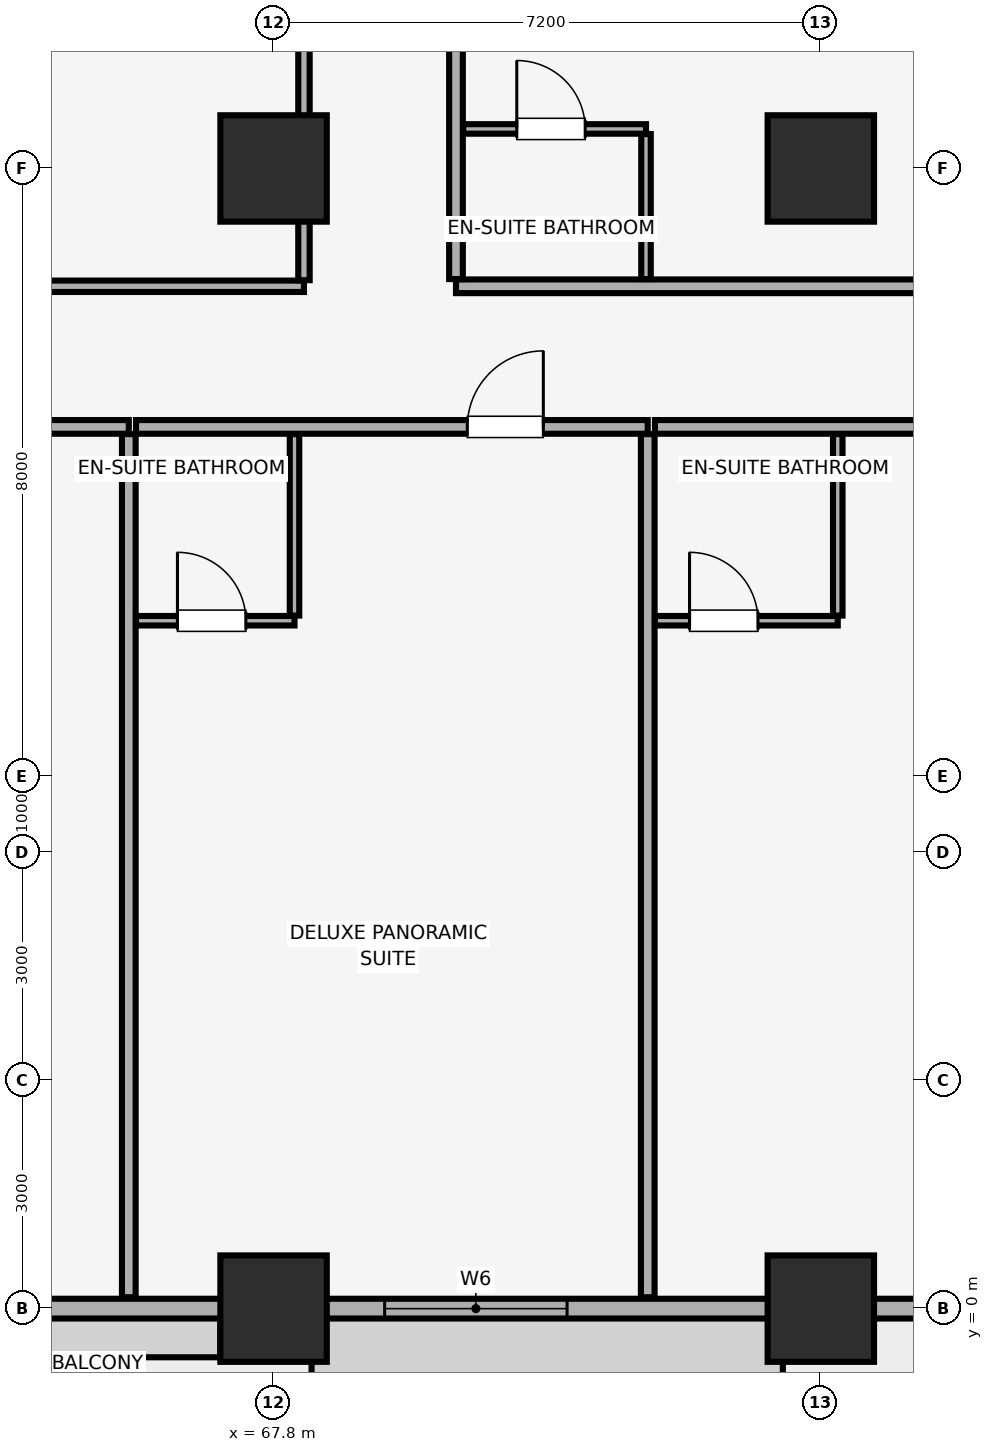
"""IFC4 building model, lengths in metres.
Left out: names, types, materials, properties, quantities, classifications, styles, units other than length and angle.
Written with IfcOpenShell. Run it as: python <this file> out.ifc"""

import sys

from ifc_helpers import new_model, si_unit, direction, frame, frame_2d, origin, origin_2d, place, context, subcontext, project, spatial, rectangle, extrude, element, fill, save


model = new_model("IFC4")
c1 = context("Model", 3, precision=1e-05, world=origin(), true_north=direction((0.0, 1.0)))
c2 = subcontext(c1, "Body", "Model", "MODEL_VIEW")
j1 = project(units=[si_unit("LENGTHUNIT", "METRE"), si_unit("PLANEANGLEUNIT", "RADIAN")], contexts=[c1])
p1 = place(None, origin())
s1 = spatial("IfcSite", under=j1, at=p1, CompositionType="ELEMENT")
p2 = place(p1, origin())
s2 = spatial("IfcBuilding", under=s1, at=p2, CompositionType="ELEMENT")
p3 = place(p2, frame((0.0, 0.0, 57.65)))
s3 = spatial("IfcBuildingStorey", under=s2, at=p3, CompositionType="ELEMENT", Elevation=57.65)
for number, where, z_axis, x_axis in (
    (1, (67.8, 0.0, 0.0), (0.0, 0.0, 1.0), (1.0, 0.0, 0.0)),
    (2, (75.0, 0.0, 0.0), (0.0, 0.0, 1.0), (1.0, 0.0, 0.0)),
    (3, (67.8, 15.0, 0.0), (0.0, 0.0, 1.0), (1.0, 0.0, 0.0)),
    (4, (75.0, 15.0, 0.0), (0.0, 0.0, 1.0), (1.0, 0.0, 0.0)),
):
    element("IfcColumn", number, at=place(p3, frame(where, z_axis=z_axis, x_axis=x_axis)), inside=s3, PredefinedType="COLUMN", context=c2, shape_type="SweptSolid", body=[
        extrude(rectangle(XDim=1.4, YDim=1.4, at=origin_2d()), origin(), (0.0, 0.0, 1.0), 3.51),
    ])
p4 = place(p3, frame((4.2, 0.0, 0.0), z_axis=(0.0, 0.0, 1.0), x_axis=(1.0, 0.0, 0.0)))
e5 = element("IfcWall", 5, at=p4, inside=s3, PredefinedType="SOLIDWALL", context=c2, shape_type="SweptSolid", body=[
    extrude(rectangle(XDim=75.6, YDim=0.26, at=frame_2d((37.8, 0.0))), origin(), (0.0, 0.0, 1.0), 2.56),
])
p5 = place(p4, frame((21.383, 0.0, 0.0)))
e6 = element("IfcOpeningElement", 6, at=p5, cuts=e5, PredefinedType="OPENING", context=c2, shape_type="SweptSolid", body=[
    extrude(rectangle(XDim=1.1, YDim=2.15, at=frame_2d((0.55, 1.075))), frame((0.0, 0.14, 0.0), z_axis=(0.0, -1.0, 0.0), x_axis=(1.0, 0.0, 0.0)), (0.0, 0.0, 1.0), 0.28),
])
p6 = place(p4, frame((37.25, 0.0, 0.0)))
e7 = element("IfcOpeningElement", 7, at=p6, cuts=e5, PredefinedType="OPENING", context=c2, shape_type="SweptSolid", body=[
    extrude(rectangle(XDim=1.1, YDim=2.15, at=frame_2d((0.55, 1.075))), frame((0.0, 0.14, 0.0), z_axis=(0.0, -1.0, 0.0), x_axis=(1.0, 0.0, 0.0)), (0.0, 0.0, 1.0), 0.28),
])
p7 = place(p4, frame((53.117, 0.0, 0.0)))
e8 = element("IfcOpeningElement", 8, at=p7, cuts=e5, PredefinedType="OPENING", context=c2, shape_type="SweptSolid", body=[
    extrude(rectangle(XDim=1.1, YDim=2.15, at=frame_2d((0.55, 1.075))), frame((0.0, 0.14, 0.0), z_axis=(0.0, -1.0, 0.0), x_axis=(1.0, 0.0, 0.0)), (0.0, 0.0, 1.0), 0.28),
])
p8 = place(p4, frame((1.035, 0.0, 0.85)))
e9 = element("IfcOpeningElement", 9, at=p8, cuts=e5, PredefinedType="OPENING", context=c2, shape_type="SweptSolid", body=[
    extrude(rectangle(XDim=2.4, YDim=1.5, at=frame_2d((1.2, 0.75))), frame((0.0, 0.14, 0.0), z_axis=(0.0, -1.0, 0.0), x_axis=(1.0, 0.0, 0.0)), (0.0, 0.0, 1.0), 0.28),
])
p9 = place(p4, frame((8.138, 0.0, 0.85)))
e10 = element("IfcOpeningElement", 10, at=p9, cuts=e5, PredefinedType="OPENING", context=c2, shape_type="SweptSolid", body=[
    extrude(rectangle(XDim=2.4, YDim=1.5, at=frame_2d((1.2, 0.75))), frame((0.0, 0.14, 0.0), z_axis=(0.0, -1.0, 0.0), x_axis=(1.0, 0.0, 0.0)), (0.0, 0.0, 1.0), 0.28),
])
p10 = place(p4, frame((15.153, 0.0, 0.85)))
e11 = element("IfcOpeningElement", 11, at=p10, cuts=e5, PredefinedType="OPENING", context=c2, shape_type="SweptSolid", body=[
    extrude(rectangle(XDim=2.4, YDim=1.5, at=frame_2d((1.2, 0.75))), frame((0.0, 0.14, 0.0), z_axis=(0.0, -1.0, 0.0), x_axis=(1.0, 0.0, 0.0)), (0.0, 0.0, 1.0), 0.28),
])
p11 = place(p4, frame((23.127, 0.0, 0.85)))
e12 = element("IfcOpeningElement", 12, at=p11, cuts=e5, PredefinedType="OPENING", context=c2, shape_type="SweptSolid", body=[
    extrude(rectangle(XDim=2.4, YDim=1.5, at=frame_2d((1.2, 0.75))), frame((0.0, 0.14, 0.0), z_axis=(0.0, -1.0, 0.0), x_axis=(1.0, 0.0, 0.0)), (0.0, 0.0, 1.0), 0.28),
])
p12 = place(p4, frame((29.179, 0.0, 0.85)))
e13 = element("IfcOpeningElement", 13, at=p12, cuts=e5, PredefinedType="OPENING", context=c2, shape_type="SweptSolid", body=[
    extrude(rectangle(XDim=2.4, YDim=1.5, at=frame_2d((1.2, 0.75))), frame((0.0, 0.14, 0.0), z_axis=(0.0, -1.0, 0.0), x_axis=(1.0, 0.0, 0.0)), (0.0, 0.0, 1.0), 0.28),
])
p13 = place(p4, frame((34.983, 0.0, 0.85)))
e14 = element("IfcOpeningElement", 14, at=p13, cuts=e5, PredefinedType="OPENING", context=c2, shape_type="SweptSolid", body=[
    extrude(rectangle(XDim=1.5, YDim=1.4, at=frame_2d((0.75, 0.7))), frame((0.0, 0.14, 0.0), z_axis=(0.0, -1.0, 0.0), x_axis=(1.0, 0.0, 0.0)), (0.0, 0.0, 1.0), 0.28),
])
p14 = place(p4, frame((39.117, 0.0, 0.85)))
e15 = element("IfcOpeningElement", 15, at=p14, cuts=e5, PredefinedType="OPENING", context=c2, shape_type="SweptSolid", body=[
    extrude(rectangle(XDim=1.5, YDim=1.4, at=frame_2d((0.75, 0.7))), frame((0.0, 0.14, 0.0), z_axis=(0.0, -1.0, 0.0), x_axis=(1.0, 0.0, 0.0)), (0.0, 0.0, 1.0), 0.28),
])
p15 = place(p4, frame((44.021, 0.0, 0.85)))
e16 = element("IfcOpeningElement", 16, at=p15, cuts=e5, PredefinedType="OPENING", context=c2, shape_type="SweptSolid", body=[
    extrude(rectangle(XDim=2.4, YDim=1.5, at=frame_2d((1.2, 0.75))), frame((0.0, 0.14, 0.0), z_axis=(0.0, -1.0, 0.0), x_axis=(1.0, 0.0, 0.0)), (0.0, 0.0, 1.0), 0.28),
])
p16 = place(p4, frame((50.073, 0.0, 0.85)))
e17 = element("IfcOpeningElement", 17, at=p16, cuts=e5, PredefinedType="OPENING", context=c2, shape_type="SweptSolid", body=[
    extrude(rectangle(XDim=2.4, YDim=1.5, at=frame_2d((1.2, 0.75))), frame((0.0, 0.14, 0.0), z_axis=(0.0, -1.0, 0.0), x_axis=(1.0, 0.0, 0.0)), (0.0, 0.0, 1.0), 0.28),
])
p17 = place(p4, frame((58.048, 0.0, 0.85)))
e18 = element("IfcOpeningElement", 18, at=p17, cuts=e5, PredefinedType="OPENING", context=c2, shape_type="SweptSolid", body=[
    extrude(rectangle(XDim=2.4, YDim=1.5, at=frame_2d((1.2, 0.75))), frame((0.0, 0.14, 0.0), z_axis=(0.0, -1.0, 0.0), x_axis=(1.0, 0.0, 0.0)), (0.0, 0.0, 1.0), 0.28),
])
p18 = place(p4, frame((65.062, 0.0, 0.85)))
e19 = element("IfcOpeningElement", 19, at=p18, cuts=e5, PredefinedType="OPENING", context=c2, shape_type="SweptSolid", body=[
    extrude(rectangle(XDim=2.4, YDim=1.5, at=frame_2d((1.2, 0.75))), frame((0.0, 0.14, 0.0), z_axis=(0.0, -1.0, 0.0), x_axis=(1.0, 0.0, 0.0)), (0.0, 0.0, 1.0), 0.28),
])
p19 = place(p4, frame((72.165, 0.0, 0.85)))
e20 = element("IfcOpeningElement", 20, at=p19, cuts=e5, PredefinedType="OPENING", context=c2, shape_type="SweptSolid", body=[
    extrude(rectangle(XDim=2.4, YDim=1.5, at=frame_2d((1.2, 0.75))), frame((0.0, 0.14, 0.0), z_axis=(0.0, -1.0, 0.0), x_axis=(1.0, 0.0, 0.0)), (0.0, 0.0, 1.0), 0.28),
])
p20 = place(p3, frame((59.163, 11.6, 0.0), z_axis=(0.0, 0.0, 1.0), x_axis=(1.0, 0.0, 0.0)))
e21 = element("IfcWall", 21, at=p20, inside=s3, PredefinedType="PARTITIONING", context=c2, shape_type="SweptSolid", body=[
    extrude(rectangle(XDim=6.732, YDim=0.18, at=frame_2d((3.366, 0.0))), origin(), (0.0, 0.0, 1.0), 3.51),
])
p21 = place(p20, frame((4.359, 0.0, 0.0)))
e22 = element("IfcOpeningElement", 22, at=p21, cuts=e21, PredefinedType="OPENING", context=c2, shape_type="SweptSolid", body=[
    extrude(rectangle(XDim=1.0, YDim=2.15, at=frame_2d((0.5, 1.075))), frame((0.0, 0.1, 0.0), z_axis=(0.0, -1.0, 0.0), x_axis=(1.0, 0.0, 0.0)), (0.0, 0.0, 1.0), 0.2),
])
p22 = place(p3, frame((65.896, 0.15, 0.0), z_axis=(0.0, 0.0, 1.0), x_axis=(0.0, 1.0, 0.0)))
e23 = element("IfcWall", 23, at=p22, inside=s3, PredefinedType="PARTITIONING", context=c2, shape_type="SweptSolid", body=[
    extrude(rectangle(XDim=11.355, YDim=0.18, at=frame_2d((5.677, 0.0))), origin(), (0.0, 0.0, 1.0), 3.51),
])
p23 = place(p3, frame((65.99, 11.6, 0.0), z_axis=(0.0, 0.0, 1.0), x_axis=(1.0, 0.0, 0.0)))
e24 = element("IfcWall", 24, at=p23, inside=s3, PredefinedType="PARTITIONING", context=c2, shape_type="SweptSolid", body=[
    extrude(rectangle(XDim=6.732, YDim=0.18, at=frame_2d((3.366, 0.0))), origin(), (0.0, 0.0, 1.0), 3.51),
])
p24 = place(p23, frame((4.359, 0.0, 0.0)))
e25 = element("IfcOpeningElement", 25, at=p24, cuts=e24, PredefinedType="OPENING", context=c2, shape_type="SweptSolid", body=[
    extrude(rectangle(XDim=1.0, YDim=2.15, at=frame_2d((0.5, 1.075))), frame((0.0, 0.1, 0.0), z_axis=(0.0, -1.0, 0.0), x_axis=(1.0, 0.0, 0.0)), (0.0, 0.0, 1.0), 0.2),
])
p25 = place(p3, frame((72.723, 0.15, 0.0), z_axis=(0.0, 0.0, 1.0), x_axis=(0.0, 1.0, 0.0)))
e26 = element("IfcWall", 26, at=p25, inside=s3, PredefinedType="PARTITIONING", context=c2, shape_type="SweptSolid", body=[
    extrude(rectangle(XDim=11.355, YDim=0.18, at=frame_2d((5.677, 0.0))), origin(), (0.0, 0.0, 1.0), 3.51),
])
p26 = place(p3, frame((65.99, 9.05, 0.0), z_axis=(0.0, 0.0, 1.0), x_axis=(1.0, 0.0, 0.0)))
e27 = element("IfcWall", 27, at=p26, inside=s3, PredefinedType="PARTITIONING", context=c2, shape_type="SweptSolid", body=[
    extrude(rectangle(XDim=2.085, YDim=0.125, at=frame_2d((1.042, 0.0))), origin(), (0.0, 0.0, 1.0), 3.51),
])
p27 = place(p26, frame((0.545, 0.0, 0.0)))
e28 = element("IfcOpeningElement", 28, at=p27, cuts=e27, PredefinedType="OPENING", context=c2, shape_type="SweptSolid", body=[
    extrude(rectangle(XDim=0.9, YDim=2.1, at=frame_2d((0.45, 1.05))), frame((0.0, 0.073, 0.0), z_axis=(0.0, -1.0, 0.0), x_axis=(1.0, 0.0, 0.0)), (0.0, 0.0, 1.0), 0.145),
])
p28 = place(p3, frame((68.075, 9.117, 0.0), z_axis=(0.0, 0.0, 1.0), x_axis=(0.0, 1.0, 0.0)))
e29 = element("IfcWall", 29, at=p28, inside=s3, PredefinedType="PARTITIONING", context=c2, shape_type="SweptSolid", body=[
    extrude(rectangle(XDim=2.387, YDim=0.125, at=frame_2d((1.194, 0.0))), origin(), (0.0, 0.0, 1.0), 3.51),
])
p29 = place(p3, frame((72.818, 11.6, 0.0), z_axis=(0.0, 0.0, 1.0), x_axis=(1.0, 0.0, 0.0)))
e30 = element("IfcWall", 30, at=p29, inside=s3, PredefinedType="PARTITIONING", context=c2, shape_type="SweptSolid", body=[
    extrude(rectangle(XDim=11.032, YDim=0.18, at=frame_2d((5.516, 0.0))), origin(), (0.0, 0.0, 1.0), 3.51),
])
p30 = place(p29, frame((4.519, 0.0, 0.0)))
e31 = element("IfcOpeningElement", 31, at=p30, cuts=e30, PredefinedType="OPENING", context=c2, shape_type="SweptSolid", body=[
    extrude(rectangle(XDim=1.0, YDim=2.15, at=frame_2d((0.5, 1.075))), frame((0.0, 0.1, 0.0), z_axis=(0.0, -1.0, 0.0), x_axis=(1.0, 0.0, 0.0)), (0.0, 0.0, 1.0), 0.2),
])
p31 = place(p3, frame((72.818, 9.05, 0.0), z_axis=(0.0, 0.0, 1.0), x_axis=(1.0, 0.0, 0.0)))
e32 = element("IfcWall", 32, at=p31, inside=s3, PredefinedType="PARTITIONING", context=c2, shape_type="SweptSolid", body=[
    extrude(rectangle(XDim=2.405, YDim=0.125, at=frame_2d((1.203, 0.0))), origin(), (0.0, 0.0, 1.0), 3.51),
])
p32 = place(p31, frame((0.455, 0.0, 0.0)))
e33 = element("IfcOpeningElement", 33, at=p32, cuts=e32, PredefinedType="OPENING", context=c2, shape_type="SweptSolid", body=[
    extrude(rectangle(XDim=0.9, YDim=2.1, at=frame_2d((0.45, 1.05))), frame((0.0, 0.073, 0.0), z_axis=(0.0, -1.0, 0.0), x_axis=(1.0, 0.0, 0.0)), (0.0, 0.0, 1.0), 0.145),
])
p33 = place(p3, frame((75.223, 9.117, 0.0), z_axis=(0.0, 0.0, 1.0), x_axis=(0.0, 1.0, 0.0)))
e34 = element("IfcWall", 34, at=p33, inside=s3, PredefinedType="PARTITIONING", context=c2, shape_type="SweptSolid", body=[
    extrude(rectangle(XDim=2.387, YDim=0.125, at=frame_2d((1.194, 0.0))), origin(), (0.0, 0.0, 1.0), 2.898),
])
p34 = place(p3, frame((57.88, 13.45, 0.0), z_axis=(0.0, 0.0, 1.0), x_axis=(1.0, 0.0, 0.0)))
e35 = element("IfcWall", 35, at=p34, inside=s3, PredefinedType="PARTITIONING", context=c2, shape_type="SweptSolid", body=[
    extrude(rectangle(XDim=10.32, YDim=0.15, at=frame_2d((5.16, 0.0))), origin(), (0.0, 0.0, 1.0), 3.51),
])
p35 = place(p34, frame((4.62, 0.0, 0.0)))
e36 = element("IfcOpeningElement", 36, at=p35, cuts=e35, PredefinedType="OPENING", context=c2, shape_type="SweptSolid", body=[
    extrude(rectangle(XDim=1.0, YDim=2.15, at=frame_2d((0.5, 1.075))), frame((0.0, 0.085, 0.0), z_axis=(0.0, -1.0, 0.0), x_axis=(1.0, 0.0, 0.0)), (0.0, 0.0, 1.0), 0.17),
])
p36 = place(p3, frame((68.2, 13.53, 0.0), z_axis=(0.0, 0.0, 1.0), x_axis=(0.0, 1.0, 0.0)))
e37 = element("IfcWall", 37, at=p36, inside=s3, PredefinedType="PARTITIONING", context=c2, shape_type="SweptSolid", body=[
    extrude(rectangle(XDim=15.86, YDim=0.15, at=frame_2d((7.93, 0.0))), origin(), (0.0, 0.0, 1.0), 3.51),
])
p37 = place(p3, frame((70.2, 13.45, 0.0), z_axis=(0.0, 0.0, 1.0), x_axis=(1.0, 0.0, 0.0)))
e38 = element("IfcWall", 38, at=p37, inside=s3, PredefinedType="PARTITIONING", context=c2, shape_type="SweptSolid", body=[
    extrude(rectangle(XDim=13.65, YDim=0.18, at=frame_2d((6.825, 0.0))), origin(), (0.0, 0.0, 1.0), 3.51),
])
p38 = place(p3, frame((70.2, 13.545, 0.0), z_axis=(0.0, 0.0, 1.0), x_axis=(0.0, 1.0, 0.0)))
e39 = element("IfcWall", 39, at=p38, inside=s3, PredefinedType="PARTITIONING", context=c2, shape_type="SweptSolid", body=[
    extrude(rectangle(XDim=7.78, YDim=0.18, at=frame_2d((3.89, 0.0))), origin(), (0.0, 0.0, 1.0), 3.51),
])
p39 = place(p38, frame((4.875, 0.0, 0.0)))
e40 = element("IfcOpeningElement", 40, at=p39, cuts=e39, PredefinedType="OPENING", context=c2, shape_type="SweptSolid", body=[
    extrude(rectangle(XDim=1.0, YDim=2.15, at=frame_2d((0.5, 1.075))), frame((0.0, 0.1, 0.0), z_axis=(0.0, -1.0, 0.0), x_axis=(1.0, 0.0, 0.0)), (0.0, 0.0, 1.0), 0.2),
])
p40 = place(p3, frame((70.295, 15.52, 0.0), z_axis=(0.0, 0.0, 1.0), x_axis=(1.0, 0.0, 0.0)))
e41 = element("IfcWall", 41, at=p40, inside=s3, PredefinedType="PARTITIONING", context=c2, shape_type="SweptSolid", body=[
    extrude(rectangle(XDim=2.405, YDim=0.125, at=frame_2d((1.203, 0.0))), origin(), (0.0, 0.0, 1.0), 3.51),
])
p41 = place(p40, frame((0.705, 0.0, 0.0)))
e42 = element("IfcOpeningElement", 42, at=p41, cuts=e41, PredefinedType="OPENING", context=c2, shape_type="SweptSolid", body=[
    extrude(rectangle(XDim=0.9, YDim=2.1, at=frame_2d((0.45, 1.05))), frame((0.0, 0.073, 0.0), z_axis=(0.0, -1.0, 0.0), x_axis=(1.0, 0.0, 0.0)), (0.0, 0.0, 1.0), 0.145),
])
p42 = place(p3, frame((72.7, 13.545, 0.0), z_axis=(0.0, 0.0, 1.0), x_axis=(0.0, 1.0, 0.0)))
e43 = element("IfcWall", 43, at=p42, inside=s3, PredefinedType="PARTITIONING", context=c2, shape_type="SweptSolid", body=[
    extrude(rectangle(XDim=1.907, YDim=0.125, at=frame_2d((0.954, 0.0))), origin(), (0.0, 0.0, 1.0), 3.51),
])
p43 = place(p18, origin())
e44 = element("IfcWindow", 44, at=p43, inside=s3, PartitioningType="SINGLE_PANEL", PredefinedType="WINDOW", context=c2, shape_type="SweptSolid", body=[
    extrude(rectangle(XDim=2.4, YDim=1.5, at=frame_2d((1.2, 0.75))), frame((0.0, 0.03, 0.0), z_axis=(0.0, -1.0, 0.0), x_axis=(1.0, 0.0, 0.0)), (0.0, 0.0, 1.0), 0.06),
])
fill(e19, e44)
p44 = place(p24, origin())
e45 = element("IfcDoor", 45, at=p44, inside=s3, OperationType="SINGLE_SWING_RIGHT", PredefinedType="DOOR", context=c2, shape_type="SweptSolid", body=[
    extrude(rectangle(XDim=1.0, YDim=2.15, at=frame_2d((0.5, 1.075))), frame((0.0, 0.025, 0.0), z_axis=(0.0, -1.0, 0.0), x_axis=(1.0, 0.0, 0.0)), (0.0, 0.0, 1.0), 0.05),
])
fill(e25, e45)
p45 = place(p27, origin())
e46 = element("IfcDoor", 46, at=p45, inside=s3, OperationType="SINGLE_SWING_LEFT", PredefinedType="DOOR", context=c2, shape_type="SweptSolid", body=[
    extrude(rectangle(XDim=0.9, YDim=2.1, at=frame_2d((0.45, 1.05))), frame((0.0, 0.025, 0.0), z_axis=(0.0, -1.0, 0.0), x_axis=(1.0, 0.0, 0.0)), (0.0, 0.0, 1.0), 0.05),
])
fill(e28, e46)
p46 = place(p32, origin())
e47 = element("IfcDoor", 47, at=p46, inside=s3, OperationType="SINGLE_SWING_LEFT", PredefinedType="DOOR", context=c2, shape_type="SweptSolid", body=[
    extrude(rectangle(XDim=0.9, YDim=2.1, at=frame_2d((0.45, 1.05))), frame((0.0, 0.025, 0.0), z_axis=(0.0, -1.0, 0.0), x_axis=(1.0, 0.0, 0.0)), (0.0, 0.0, 1.0), 0.05),
])
fill(e33, e47)
p47 = place(p41, origin())
e48 = element("IfcDoor", 48, at=p47, inside=s3, OperationType="SINGLE_SWING_LEFT", PredefinedType="DOOR", context=c2, shape_type="SweptSolid", body=[
    extrude(rectangle(XDim=0.9, YDim=2.1, at=frame_2d((0.45, 1.05))), frame((0.0, 0.025, 0.0), z_axis=(0.0, -1.0, 0.0), x_axis=(1.0, 0.0, 0.0)), (0.0, 0.0, 1.0), 0.05),
])
fill(e42, e48)
save(model, sys.argv[1])
